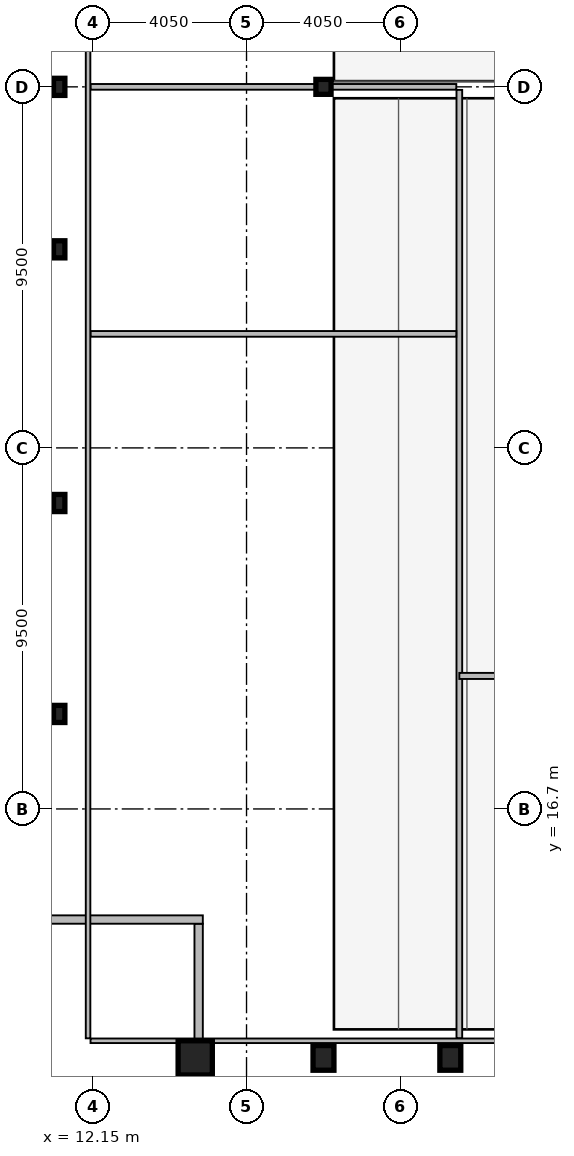
"""IFC4 building model, lengths in metres.
Left out: names, types, materials, properties, quantities, classifications, styles, units other than length and angle.
Written with IfcOpenShell. Run it as: python <this file> out.ifc"""

import sys

from ifc_helpers import new_model, si_unit, direction, frame, frame_2d, origin, origin_2d, place, context, subcontext, project, spatial, rectangle, hollow_rectangle, i_section, extrude, element, fill, save


model = new_model("IFC4")
c1 = context("Model", 3, precision=1e-05, world=origin(), true_north=direction((0.0, 1.0)))
c2 = subcontext(c1, "Body", "Model", "MODEL_VIEW")
j1 = project(units=[si_unit("LENGTHUNIT", "METRE"), si_unit("PLANEANGLEUNIT", "RADIAN")], contexts=[c1])
p1 = place(None, origin())
s1 = spatial("IfcSite", under=j1, at=p1, CompositionType="ELEMENT")
p2 = place(p1, origin())
s2 = spatial("IfcBuilding", under=s1, at=p2, CompositionType="ELEMENT")
p3 = place(p2, frame((0.0, 0.0, 329.0)))
s3 = spatial("IfcBuildingStorey", under=s2, at=p3, CompositionType="ELEMENT", Elevation=329.0)
p4 = place(p3, frame((14.85, 10.15, 0.0), z_axis=(0.0, 0.0, 1.0), x_axis=(1.0, 0.0, 0.0)))
e1 = element("IfcColumn", 1, at=p4, inside=s3, PredefinedType="COLUMN", context=c2, shape_type="SweptSolid", body=[
    extrude(hollow_rectangle(XDim=0.9, YDim=0.9, WallThickness=0.05, at=origin_2d()), origin(), (0.0, 0.0, 1.0), 3.6),
])
for number, where, z_axis, x_axis in (
    (2, (18.225, 10.15, 0.0), (0.0, 0.0, 1.0), (1.0, 0.0, 0.0)),
    (3, (21.562, 10.15, 0.0), (0.0, 0.0, 1.0), (1.0, 0.0, 0.0)),
):
    element("IfcColumn", number, at=place(p3, frame(where, z_axis=z_axis, x_axis=x_axis)), inside=s3, PredefinedType="COLUMN", context=c2, shape_type="SweptSolid", body=[
        extrude(hollow_rectangle(XDim=0.55, YDim=0.65, WallThickness=0.04, at=origin_2d()), origin(), (0.0, 0.0, 1.0), 3.6),
    ])
for number, where, z_axis, x_axis in (
    (4, (11.27, 19.2, 0.0), (0.0, 0.0, 1.0), (1.0, 0.0, 0.0)),
    (5, (11.27, 24.75, 0.0), (0.0, 0.0, 1.0), (1.0, 0.0, 0.0)),
    (6, (11.27, 31.425, 0.0), (0.0, 0.0, 1.0), (1.0, 0.0, 0.0)),
    (7, (11.27, 35.7, 0.0), (0.0, 0.0, 1.0), (1.0, 0.0, 0.0)),
):
    element("IfcColumn", number, at=place(p3, frame(where, z_axis=z_axis, x_axis=x_axis)), inside=s3, PredefinedType="COLUMN", context=c2, shape_type="SweptSolid", body=[
        extrude(i_section(OverallWidth=0.3, OverallDepth=0.45, WebThickness=0.014, FlangeThickness=0.026, at=origin_2d()), origin(), (0.0, 0.0, 1.0), 3.6),
    ])
p5 = place(p3, frame((18.225, 35.7, 0.0), z_axis=(0.0, 0.0, 1.0), x_axis=(1.0, 0.0, 0.0)))
e8 = element("IfcColumn", 8, at=p5, inside=s3, PredefinedType="COLUMN", context=c2, shape_type="SweptSolid", body=[
    extrude(i_section(OverallWidth=0.399, OverallDepth=0.393, WebThickness=0.023, FlangeThickness=0.037, at=origin_2d()), origin(), (0.0, 0.0, 1.0), 3.6),
])
p6 = place(p3, frame((14.94, 9.77, 0.0), z_axis=(0.0, 0.0, 1.0), x_axis=(0.0, 1.0, 0.0)))
e9 = element("IfcWall", 9, at=p6, inside=s3, PredefinedType="SOLIDWALL", context=c2, shape_type="SweptSolid", body=[
    extrude(rectangle(XDim=3.91, YDim=0.22, at=frame_2d((1.955, 0.0))), origin(), (0.0, 0.0, 1.0), 2.88),
])
p7 = place(p3, frame((15.05, 13.79, 0.0), z_axis=(0.0, 0.0, 1.0), x_axis=(-1.0, 0.0, 0.0)))
e10 = element("IfcWall", 10, at=p7, inside=s3, PredefinedType="SOLIDWALL", context=c2, shape_type="SweptSolid", body=[
    extrude(rectangle(XDim=4.22, YDim=0.22, at=frame_2d((2.11, 0.0))), origin(), (0.0, 0.0, 1.0), 2.88),
])
p8 = place(p3, frame((21.8, 10.665, 0.0), z_axis=(0.0, 0.0, 1.0), x_axis=(0.0, 1.0, 0.0)))
e11 = element("IfcWall", 11, at=p8, inside=s3, PredefinedType="PARTITIONING", context=c2, shape_type="SweptSolid", body=[
    extrude(rectangle(XDim=24.955, YDim=0.15, at=frame_2d((12.478, 0.0))), origin(), (0.0, 0.0, 1.0), 3.07),
])
p9 = place(p8, frame((4.2, 0.0, 0.0)))
e12 = element("IfcOpeningElement", 12, at=p9, cuts=e11, PredefinedType="OPENING", context=c2, shape_type="SweptSolid", body=[
    extrude(rectangle(XDim=1.1, YDim=2.1, at=frame_2d((0.55, 1.05))), frame((0.0, 0.085, 0.0), z_axis=(0.0, -1.0, 0.0), x_axis=(1.0, 0.0, 0.0)), (0.0, 0.0, 1.0), 0.17),
])
p10 = place(p3, frame((12.095, 35.7, 0.0), z_axis=(0.0, 0.0, 1.0), x_axis=(1.0, 0.0, 0.0)))
e13 = element("IfcWall", 13, at=p10, inside=s3, PredefinedType="PARTITIONING", context=c2, shape_type="SweptSolid", body=[
    extrude(rectangle(XDim=9.625, YDim=0.15, at=frame_2d((4.812, 0.0))), origin(), (0.0, 0.0, 1.0), 2.83),
])
p11 = place(p10, frame((2.8, 0.0, 0.0)))
e14 = element("IfcOpeningElement", 14, at=p11, cuts=e13, PredefinedType="OPENING", context=c2, shape_type="SweptSolid", body=[
    extrude(rectangle(XDim=1.0, YDim=2.05, at=frame_2d((0.5, 1.025))), frame((0.0, 0.085, 0.0), z_axis=(0.0, -1.0, 0.0), x_axis=(1.0, 0.0, 0.0)), (0.0, 0.0, 1.0), 0.17),
])
p12 = place(p3, frame((12.095, 29.2, 0.0), z_axis=(0.0, 0.0, 1.0), x_axis=(1.0, 0.0, 0.0)))
e15 = element("IfcWall", 15, at=p12, inside=s3, PredefinedType="PARTITIONING", context=c2, shape_type="SweptSolid", body=[
    extrude(rectangle(XDim=9.625, YDim=0.15, at=frame_2d((4.812, 0.0))), origin(), (0.0, 0.0, 1.0), 2.83),
])
p13 = place(p12, frame((2.2, 0.0, 0.0)))
e16 = element("IfcOpeningElement", 16, at=p13, cuts=e15, PredefinedType="OPENING", context=c2, shape_type="SweptSolid", body=[
    extrude(rectangle(XDim=0.9, YDim=2.05, at=frame_2d((0.45, 1.025))), frame((0.0, 0.085, 0.0), z_axis=(0.0, -1.0, 0.0), x_axis=(1.0, 0.0, 0.0)), (0.0, 0.0, 1.0), 0.17),
])
p14 = place(p3, frame((21.8, 20.2, 0.0), z_axis=(0.0, 0.0, 1.0), x_axis=(1.0, 0.0, 0.0)))
e17 = element("IfcWall", 17, at=p14, inside=s3, PredefinedType="PARTITIONING", context=c2, shape_type="SweptSolid", body=[
    extrude(rectangle(XDim=8.599, YDim=0.16, at=frame_2d((4.299, 0.0))), origin(), (0.0, 0.0, 1.0), 2.83),
])
p15 = place(p14, frame((3.611, 0.0, 0.0)))
e18 = element("IfcOpeningElement", 18, at=p15, cuts=e17, PredefinedType="OPENING", context=c2, shape_type="SweptSolid", body=[
    extrude(rectangle(XDim=1.0, YDim=2.05, at=frame_2d((0.5, 1.025))), frame((0.0, 0.09, 0.0), z_axis=(0.0, -1.0, 0.0), x_axis=(1.0, 0.0, 0.0)), (0.0, 0.0, 1.0), 0.18),
])
p16 = place(p3, frame((12.03, 10.665, 0.0), z_axis=(0.0, 0.0, 1.0), x_axis=(0.0, 1.0, 0.0)))
e19 = element("IfcWall", 19, at=p16, inside=s3, PredefinedType="PARTITIONING", context=c2, shape_type="SweptSolid", body=[
    extrude(rectangle(XDim=42.11, YDim=0.12, at=frame_2d((21.055, 0.0))), origin(), (0.0, 0.0, 1.0), 2.83),
])
p17 = place(p3, frame((12.095, 10.6, 0.0), z_axis=(0.0, 0.0, 1.0), x_axis=(1.0, 0.0, 0.0)))
e20 = element("IfcWall", 20, at=p17, inside=s3, PredefinedType="PARTITIONING", context=c2, shape_type="SweptSolid", body=[
    extrude(rectangle(XDim=48.71, YDim=0.12, at=frame_2d((24.355, 0.0))), origin(), (0.0, 0.0, 1.0), 2.83),
])
p18 = place(p9, origin())
e21 = element("IfcDoor", 21, at=p18, inside=s3, OperationType="SINGLE_SWING_LEFT", PredefinedType="DOOR", context=c2, shape_type="SweptSolid", body=[
    extrude(rectangle(XDim=1.1, YDim=2.1, at=frame_2d((0.55, 1.05))), frame((0.0, 0.025, 0.0), z_axis=(0.0, -1.0, 0.0), x_axis=(1.0, 0.0, 0.0)), (0.0, 0.0, 1.0), 0.05),
])
fill(e12, e21)
p19 = place(p11, origin())
e22 = element("IfcDoor", 22, at=p19, inside=s3, OperationType="SINGLE_SWING_RIGHT", PredefinedType="DOOR", context=c2, shape_type="SweptSolid", body=[
    extrude(rectangle(XDim=1.0, YDim=2.05, at=frame_2d((0.5, 1.025))), frame((0.0, 0.025, 0.0), z_axis=(0.0, -1.0, 0.0), x_axis=(1.0, 0.0, 0.0)), (0.0, 0.0, 1.0), 0.05),
])
fill(e14, e22)
p20 = place(p13, origin())
e23 = element("IfcDoor", 23, at=p20, inside=s3, OperationType="SINGLE_SWING_LEFT", PredefinedType="DOOR", context=c2, shape_type="SweptSolid", body=[
    extrude(rectangle(XDim=0.9, YDim=2.05, at=frame_2d((0.45, 1.025))), frame((0.0, 0.025, 0.0), z_axis=(0.0, -1.0, 0.0), x_axis=(1.0, 0.0, 0.0)), (0.0, 0.0, 1.0), 0.05),
])
fill(e16, e23)
save(model, sys.argv[1])
